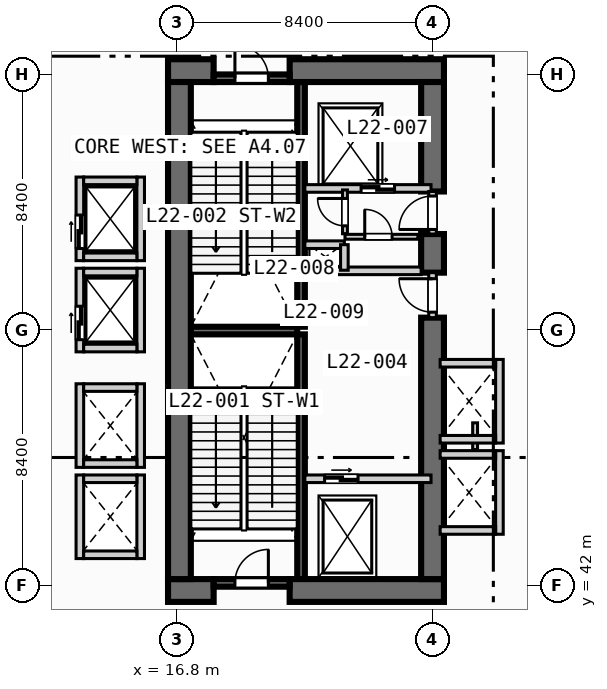
"""IFC4 building model, lengths in metres.
Left out: names, types, materials, properties, quantities, classifications, styles, units other than length and angle.
Written with IfcOpenShell. Run it as: python <this file> out.ifc"""

import sys

from ifc_helpers import new_model, si_unit, direction, frame, frame_2d, origin, place, context, subcontext, project, spatial, rectangle, extrude, element, fill, save


model = new_model("IFC4")
c1 = context("Model", 3, precision=1e-05, world=origin(), true_north=direction((0.0, 1.0)))
c2 = subcontext(c1, "Body", "Model", "MODEL_VIEW")
j1 = project(units=[si_unit("LENGTHUNIT", "METRE"), si_unit("PLANEANGLEUNIT", "RADIAN")], contexts=[c1])
p1 = place(None, origin())
s1 = spatial("IfcSite", under=j1, at=p1, CompositionType="ELEMENT")
p2 = place(p1, origin())
s2 = spatial("IfcBuilding", under=s1, at=p2, CompositionType="ELEMENT")
p3 = place(p2, frame((0.0, 0.0, 94.0)))
s3 = spatial("IfcBuildingStorey", under=s2, at=p3, CompositionType="ELEMENT", Elevation=94.0)
for number, where, z_axis, x_axis in (
    (1, (20.875, 42.2, 0.0), (0.0, 0.0, 1.0), (0.0, 1.0, 0.0)),
    (2, (20.875, 50.5, 0.0), (0.0, 0.0, 1.0), (0.0, 1.0, 0.0)),
):
    element("IfcWall", number, at=place(p3, frame(where, z_axis=z_axis, x_axis=x_axis)), inside=s3, PredefinedType="SOLIDWALL", context=c2, shape_type="SweptSolid", body=[
        extrude(rectangle(XDim=8.05, YDim=0.25, at=frame_2d((4.025, 0.0))), origin(), (0.0, 0.0, 1.0), 5.75),
    ])
p4 = place(p3, frame((17.25, 50.375, 0.0), z_axis=(0.0, 0.0, 1.0), x_axis=(1.0, 0.0, 0.0)))
e3 = element("IfcWall", 3, at=p4, inside=s3, PredefinedType="SOLIDWALL", context=c2, shape_type="SweptSolid", body=[
    extrude(rectangle(XDim=3.5, YDim=0.25, at=frame_2d((1.75, 0.0))), origin(), (0.0, 0.0, 1.0), 5.75),
])
p5 = place(p3, frame((16.5, 41.825, 0.0), z_axis=(0.0, 0.0, 1.0), x_axis=(1.0, 0.0, 0.0)))
e4 = element("IfcWall", 4, at=p5, inside=s3, PredefinedType="SHEAR", context=c2, shape_type="SweptSolid", body=[
    extrude(rectangle(XDim=1.5, YDim=0.75, at=frame_2d((0.75, 0.0))), origin(), (0.0, 0.0, 1.0), 5.75),
])
p6 = place(p3, frame((20.5, 41.825, 0.0), z_axis=(0.0, 0.0, 1.0), x_axis=(1.0, 0.0, 0.0)))
e5 = element("IfcWall", 5, at=p6, inside=s3, PredefinedType="SHEAR", context=c2, shape_type="SweptSolid", body=[
    extrude(rectangle(XDim=5.075, YDim=0.75, at=frame_2d((2.538, 0.0))), origin(), (0.0, 0.0, 1.0), 5.75),
])
p7 = place(p3, frame((16.5, 58.925, 0.0), z_axis=(0.0, 0.0, 1.0), x_axis=(1.0, 0.0, 0.0)))
e6 = element("IfcWall", 6, at=p7, inside=s3, PredefinedType="SHEAR", context=c2, shape_type="SweptSolid", body=[
    extrude(rectangle(XDim=1.5, YDim=0.75, at=frame_2d((0.75, 0.0))), origin(), (0.0, 0.0, 1.0), 5.75),
])
p8 = place(p3, frame((20.5, 58.925, 0.0), z_axis=(0.0, 0.0, 1.0), x_axis=(1.0, 0.0, 0.0)))
e7 = element("IfcWall", 7, at=p8, inside=s3, PredefinedType="SHEAR", context=c2, shape_type="SweptSolid", body=[
    extrude(rectangle(XDim=5.075, YDim=0.75, at=frame_2d((2.538, 0.0))), origin(), (0.0, 0.0, 1.0), 5.75),
])
p9 = place(p3, frame((16.875, 42.2, 0.0), z_axis=(0.0, 0.0, 1.0), x_axis=(0.0, 1.0, 0.0)))
e8 = element("IfcWall", 8, at=p9, inside=s3, PredefinedType="SHEAR", context=c2, shape_type="SweptSolid", body=[
    extrude(rectangle(XDim=16.35, YDim=0.75, at=frame_2d((8.175, 0.0))), origin(), (0.0, 0.0, 1.0), 5.75),
])
p10 = place(p3, frame((25.2, 42.2, 0.0), z_axis=(0.0, 0.0, 1.0), x_axis=(0.0, 1.0, 0.0)))
e9 = element("IfcWall", 9, at=p10, inside=s3, PredefinedType="SHEAR", context=c2, shape_type="SweptSolid", body=[
    extrude(rectangle(XDim=8.6, YDim=0.75, at=frame_2d((4.3, 0.0))), origin(), (0.0, 0.0, 1.0), 5.75),
])
p11 = place(p3, frame((25.2, 52.28, 0.0), z_axis=(0.0, 0.0, 1.0), x_axis=(0.0, 1.0, 0.0)))
e10 = element("IfcWall", 10, at=p11, inside=s3, PredefinedType="SHEAR", context=c2, shape_type="SweptSolid", body=[
    extrude(rectangle(XDim=1.27, YDim=0.75, at=frame_2d((0.635, 0.0))), origin(), (0.0, 0.0, 1.0), 5.75),
])
p12 = place(p3, frame((25.2, 54.95, 0.0), z_axis=(0.0, 0.0, 1.0), x_axis=(0.0, 1.0, 0.0)))
e11 = element("IfcWall", 11, at=p12, inside=s3, PredefinedType="SHEAR", context=c2, shape_type="SweptSolid", body=[
    extrude(rectangle(XDim=3.6, YDim=0.75, at=frame_2d((1.8, 0.0))), origin(), (0.0, 0.0, 1.0), 5.75),
])
p13 = place(p3, frame((18.0, 42.075, 0.0), z_axis=(0.0, 0.0, 1.0), x_axis=(1.0, 0.0, 0.0)))
e12 = element("IfcWall", 12, at=p13, inside=s3, PredefinedType="SOLIDWALL", context=c2, shape_type="SweptSolid", body=[
    extrude(rectangle(XDim=2.5, YDim=0.25, at=frame_2d((1.25, 0.0))), origin(), (0.0, 0.0, 1.0), 5.75),
])
p14 = place(p13, frame((0.7, 0.0, 0.0)))
e13 = element("IfcOpeningElement", 13, at=p14, cuts=e12, PredefinedType="OPENING", context=c2, shape_type="SweptSolid", body=[
    extrude(rectangle(XDim=1.1, YDim=2.15, at=frame_2d((0.55, 1.075))), frame((0.0, 0.135, 0.0), z_axis=(0.0, -1.0, 0.0), x_axis=(1.0, 0.0, 0.0)), (0.0, 0.0, 1.0), 0.27),
])
p15 = place(p3, frame((18.0, 58.675, 0.0), z_axis=(0.0, 0.0, 1.0), x_axis=(1.0, 0.0, 0.0)))
e14 = element("IfcWall", 14, at=p15, inside=s3, PredefinedType="SOLIDWALL", context=c2, shape_type="SweptSolid", body=[
    extrude(rectangle(XDim=2.5, YDim=0.25, at=frame_2d((1.25, 0.0))), origin(), (0.0, 0.0, 1.0), 5.75),
])
p16 = place(p15, frame((0.7, 0.0, 0.0)))
e15 = element("IfcOpeningElement", 15, at=p16, cuts=e14, PredefinedType="OPENING", context=c2, shape_type="SweptSolid", body=[
    extrude(rectangle(XDim=1.1, YDim=2.15, at=frame_2d((0.55, 1.075))), frame((0.0, 0.135, 0.0), z_axis=(0.0, -1.0, 0.0), x_axis=(1.0, 0.0, 0.0)), (0.0, 0.0, 1.0), 0.27),
])
p17 = place(p3, frame((21.0, 45.5, 0.0), z_axis=(0.0, 0.0, 1.0), x_axis=(1.0, 0.0, 0.0)))
e16 = element("IfcWall", 16, at=p17, inside=s3, PredefinedType="SOLIDWALL", context=c2, shape_type="SweptSolid", body=[
    extrude(rectangle(XDim=4.15, YDim=0.25, at=frame_2d((2.075, 0.0))), origin(), (0.0, 0.0, 1.0), 5.75),
])
p18 = place(p17, frame((0.65, 0.0, 0.0)))
e17 = element("IfcOpeningElement", 17, at=p18, cuts=e16, PredefinedType="OPENING", context=c2, shape_type="SweptSolid", body=[
    extrude(rectangle(XDim=1.1, YDim=2.15, at=frame_2d((0.55, 1.075))), frame((0.0, 0.135, 0.0), z_axis=(0.0, -1.0, 0.0), x_axis=(1.0, 0.0, 0.0)), (0.0, 0.0, 1.0), 0.27),
])
p19 = place(p3, frame((25.2, 50.8, 0.0), z_axis=(0.0, 0.0, 1.0), x_axis=(0.0, 1.0, 0.0)))
e18 = element("IfcWall", 18, at=p19, inside=s3, PredefinedType="SOLIDWALL", context=c2, shape_type="SweptSolid", body=[
    extrude(rectangle(XDim=1.48, YDim=0.25, at=frame_2d((0.74, 0.0))), origin(), (0.0, 0.0, 1.0), 5.75),
])
p20 = place(p19, frame((0.18, 0.0, 0.0)))
e19 = element("IfcOpeningElement", 19, at=p20, cuts=e18, PredefinedType="OPENING", context=c2, shape_type="SweptSolid", body=[
    extrude(rectangle(XDim=1.1, YDim=2.15, at=frame_2d((0.55, 1.075))), frame((0.0, 0.135, 0.0), z_axis=(0.0, -1.0, 0.0), x_axis=(1.0, 0.0, 0.0)), (0.0, 0.0, 1.0), 0.27),
])
p21 = place(p3, frame((21.0, 52.34, 0.0), z_axis=(0.0, 0.0, 1.0), x_axis=(1.0, 0.0, 0.0)))
e20 = element("IfcWall", 20, at=p21, inside=s3, PredefinedType="SOLIDWALL", context=c2, shape_type="SweptSolid", body=[
    extrude(rectangle(XDim=3.825, YDim=0.25, at=frame_2d((1.913, 0.0))), origin(), (0.0, 0.0, 1.0), 5.75),
])
p22 = place(p3, frame((21.0, 55.05, 0.0), z_axis=(0.0, 0.0, 1.0), x_axis=(1.0, 0.0, 0.0)))
e21 = element("IfcWall", 21, at=p22, inside=s3, PredefinedType="SOLIDWALL", context=c2, shape_type="SweptSolid", body=[
    extrude(rectangle(XDim=4.15, YDim=0.25, at=frame_2d((2.075, 0.0))), origin(), (0.0, 0.0, 1.0), 5.75),
])
p23 = place(p22, frame((1.85, 0.0, 0.0)))
e22 = element("IfcOpeningElement", 22, at=p23, cuts=e21, PredefinedType="OPENING", context=c2, shape_type="SweptSolid", body=[
    extrude(rectangle(XDim=1.1, YDim=2.15, at=frame_2d((0.55, 1.075))), frame((0.0, 0.135, 0.0), z_axis=(0.0, -1.0, 0.0), x_axis=(1.0, 0.0, 0.0)), (0.0, 0.0, 1.0), 0.27),
])
p24 = place(p3, frame((25.2, 53.55, 0.0), z_axis=(0.0, 0.0, 1.0), x_axis=(0.0, 1.0, 0.0)))
e23 = element("IfcWall", 23, at=p24, inside=s3, PredefinedType="SOLIDWALL", context=c2, shape_type="SweptSolid", body=[
    extrude(rectangle(XDim=1.4, YDim=0.25, at=frame_2d((0.7, 0.0))), origin(), (0.0, 0.0, 1.0), 5.75),
])
p25 = place(p24, frame((0.15, 0.0, 0.0)))
e24 = element("IfcOpeningElement", 24, at=p25, cuts=e23, PredefinedType="OPENING", context=c2, shape_type="SweptSolid", body=[
    extrude(rectangle(XDim=1.1, YDim=2.15, at=frame_2d((0.55, 1.075))), frame((0.0, 0.135, 0.0), z_axis=(0.0, -1.0, 0.0), x_axis=(1.0, 0.0, 0.0)), (0.0, 0.0, 1.0), 0.27),
])
p26 = place(p3, frame((21.0, 53.2, 0.0), z_axis=(0.0, 0.0, 1.0), x_axis=(1.0, 0.0, 0.0)))
e25 = element("IfcWall", 25, at=p26, inside=s3, PredefinedType="SOLIDWALL", context=c2, shape_type="SweptSolid", body=[
    extrude(rectangle(XDim=1.3, YDim=0.25, at=frame_2d((0.65, 0.0))), origin(), (0.0, 0.0, 1.0), 5.75),
])
p27 = place(p3, frame((22.3, 52.36, 0.0), z_axis=(0.0, 0.0, 1.0), x_axis=(0.0, 1.0, 0.0)))
e26 = element("IfcWall", 26, at=p27, inside=s3, PredefinedType="SOLIDWALL", context=c2, shape_type="SweptSolid", body=[
    extrude(rectangle(XDim=0.84, YDim=0.25, at=frame_2d((0.42, 0.0))), origin(), (0.0, 0.0, 1.0), 5.75),
])
p28 = place(p3, frame((22.32, 53.56, 0.0), z_axis=(0.0, 0.0, 1.0), x_axis=(0.0, 1.0, 0.0)))
e27 = element("IfcWall", 27, at=p28, inside=s3, PredefinedType="PARTITIONING", context=c2, shape_type="SweptSolid", body=[
    extrude(rectangle(XDim=1.44, YDim=0.16, at=frame_2d((0.72, 0.0))), origin(), (0.0, 0.0, 1.0), 5.75),
])
p29 = place(p28, frame((0.26, 0.0, 0.0)))
e28 = element("IfcOpeningElement", 28, at=p29, cuts=e27, PredefinedType="OPENING", context=c2, shape_type="SweptSolid", body=[
    extrude(rectangle(XDim=0.9, YDim=2.1, at=frame_2d((0.45, 1.05))), frame((0.0, 0.09, 0.0), z_axis=(0.0, -1.0, 0.0), x_axis=(1.0, 0.0, 0.0)), (0.0, 0.0, 1.0), 0.18),
])
p30 = place(p3, frame((22.32, 53.46, 0.0), z_axis=(0.0, 0.0, 1.0), x_axis=(1.0, 0.0, 0.0)))
e29 = element("IfcWall", 29, at=p30, inside=s3, PredefinedType="PARTITIONING", context=c2, shape_type="SweptSolid", body=[
    extrude(rectangle(XDim=2.4, YDim=0.16, at=frame_2d((1.2, 0.0))), origin(), (0.0, 0.0, 1.0), 5.75),
])
p31 = place(p30, frame((0.65, 0.0, 0.0)))
e30 = element("IfcOpeningElement", 30, at=p31, cuts=e29, PredefinedType="OPENING", context=c2, shape_type="SweptSolid", body=[
    extrude(rectangle(XDim=0.9, YDim=2.1, at=frame_2d((0.45, 1.05))), frame((0.0, 0.09, 0.0), z_axis=(0.0, -1.0, 0.0), x_axis=(1.0, 0.0, 0.0)), (0.0, 0.0, 1.0), 0.18),
])
for number, where, z_axis, x_axis in (
    (31, (13.6, 42.875, 0.0), (0.0, 0.0, 1.0), (0.0, 1.0, 0.0)),
    (32, (15.6, 42.875, 0.0), (0.0, 0.0, 1.0), (0.0, 1.0, 0.0)),
):
    element("IfcWall", number, at=place(p3, frame(where, z_axis=z_axis, x_axis=x_axis)), inside=s3, PredefinedType="SOLIDWALL", context=c2, shape_type="SweptSolid", body=[
        extrude(rectangle(XDim=2.75, YDim=0.25, at=frame_2d((1.375, 0.0))), origin(), (0.0, 0.0, 1.0), 5.75),
    ])
for number, where, z_axis, x_axis in (
    (33, (13.725, 43.0, 0.0), (0.0, 0.0, 1.0), (1.0, 0.0, 0.0)),
    (34, (13.725, 45.5, 0.0), (0.0, 0.0, 1.0), (1.0, 0.0, 0.0)),
):
    element("IfcWall", number, at=place(p3, frame(where, z_axis=z_axis, x_axis=x_axis)), inside=s3, PredefinedType="SOLIDWALL", context=c2, shape_type="SweptSolid", body=[
        extrude(rectangle(XDim=1.75, YDim=0.25, at=frame_2d((0.875, 0.0))), origin(), (0.0, 0.0, 1.0), 5.75),
    ])
for number, where, z_axis, x_axis in (
    (35, (13.6, 45.875, 0.0), (0.0, 0.0, 1.0), (0.0, 1.0, 0.0)),
    (36, (15.6, 45.875, 0.0), (0.0, 0.0, 1.0), (0.0, 1.0, 0.0)),
):
    element("IfcWall", number, at=place(p3, frame(where, z_axis=z_axis, x_axis=x_axis)), inside=s3, PredefinedType="SOLIDWALL", context=c2, shape_type="SweptSolid", body=[
        extrude(rectangle(XDim=2.75, YDim=0.25, at=frame_2d((1.375, 0.0))), origin(), (0.0, 0.0, 1.0), 5.75),
    ])
for number, where, z_axis, x_axis in (
    (37, (13.725, 46.0, 0.0), (0.0, 0.0, 1.0), (1.0, 0.0, 0.0)),
    (38, (13.725, 48.5, 0.0), (0.0, 0.0, 1.0), (1.0, 0.0, 0.0)),
):
    element("IfcWall", number, at=place(p3, frame(where, z_axis=z_axis, x_axis=x_axis)), inside=s3, PredefinedType="SOLIDWALL", context=c2, shape_type="SweptSolid", body=[
        extrude(rectangle(XDim=1.75, YDim=0.25, at=frame_2d((0.875, 0.0))), origin(), (0.0, 0.0, 1.0), 5.75),
    ])
p32 = place(p3, frame((13.6, 49.675, 0.0), z_axis=(0.0, 0.0, 1.0), x_axis=(0.0, 1.0, 0.0)))
e39 = element("IfcWall", 39, at=p32, inside=s3, PredefinedType="SOLIDWALL", context=c2, shape_type="SweptSolid", body=[
    extrude(rectangle(XDim=2.75, YDim=0.25, at=frame_2d((1.375, 0.0))), origin(), (0.0, 0.0, 1.0), 5.75),
])
p33 = place(p32, frame((0.4, 0.0, 0.0)))
e40 = element("IfcOpeningElement", 40, at=p33, cuts=e39, PredefinedType="OPENING", context=c2, shape_type="SweptSolid", body=[
    extrude(rectangle(XDim=1.1, YDim=2.15, at=frame_2d((0.55, 1.075))), frame((0.0, 0.135, 0.0), z_axis=(0.0, -1.0, 0.0), x_axis=(1.0, 0.0, 0.0)), (0.0, 0.0, 1.0), 0.27),
])
p34 = place(p3, frame((15.6, 49.675, 0.0), z_axis=(0.0, 0.0, 1.0), x_axis=(0.0, 1.0, 0.0)))
e41 = element("IfcWall", 41, at=p34, inside=s3, PredefinedType="SOLIDWALL", context=c2, shape_type="SweptSolid", body=[
    extrude(rectangle(XDim=2.75, YDim=0.25, at=frame_2d((1.375, 0.0))), origin(), (0.0, 0.0, 1.0), 5.75),
])
for number, where, z_axis, x_axis in (
    (42, (13.725, 49.8, 0.0), (0.0, 0.0, 1.0), (1.0, 0.0, 0.0)),
    (43, (13.725, 52.3, 0.0), (0.0, 0.0, 1.0), (1.0, 0.0, 0.0)),
):
    element("IfcWall", number, at=place(p3, frame(where, z_axis=z_axis, x_axis=x_axis)), inside=s3, PredefinedType="SOLIDWALL", context=c2, shape_type="SweptSolid", body=[
        extrude(rectangle(XDim=1.75, YDim=0.25, at=frame_2d((0.875, 0.0))), origin(), (0.0, 0.0, 1.0), 5.75),
    ])
p35 = place(p3, frame((13.6, 52.675, 0.0), z_axis=(0.0, 0.0, 1.0), x_axis=(0.0, 1.0, 0.0)))
e44 = element("IfcWall", 44, at=p35, inside=s3, PredefinedType="SOLIDWALL", context=c2, shape_type="SweptSolid", body=[
    extrude(rectangle(XDim=2.75, YDim=0.25, at=frame_2d((1.375, 0.0))), origin(), (0.0, 0.0, 1.0), 5.75),
])
p36 = place(p35, frame((0.4, 0.0, 0.0)))
e45 = element("IfcOpeningElement", 45, at=p36, cuts=e44, PredefinedType="OPENING", context=c2, shape_type="SweptSolid", body=[
    extrude(rectangle(XDim=1.1, YDim=2.15, at=frame_2d((0.55, 1.075))), frame((0.0, 0.135, 0.0), z_axis=(0.0, -1.0, 0.0), x_axis=(1.0, 0.0, 0.0)), (0.0, 0.0, 1.0), 0.27),
])
p37 = place(p3, frame((15.6, 52.675, 0.0), z_axis=(0.0, 0.0, 1.0), x_axis=(0.0, 1.0, 0.0)))
e46 = element("IfcWall", 46, at=p37, inside=s3, PredefinedType="SOLIDWALL", context=c2, shape_type="SweptSolid", body=[
    extrude(rectangle(XDim=2.75, YDim=0.25, at=frame_2d((1.375, 0.0))), origin(), (0.0, 0.0, 1.0), 5.75),
])
for number, where, z_axis, x_axis in (
    (47, (13.725, 52.8, 0.0), (0.0, 0.0, 1.0), (1.0, 0.0, 0.0)),
    (48, (13.725, 55.3, 0.0), (0.0, 0.0, 1.0), (1.0, 0.0, 0.0)),
):
    element("IfcWall", number, at=place(p3, frame(where, z_axis=z_axis, x_axis=x_axis)), inside=s3, PredefinedType="SOLIDWALL", context=c2, shape_type="SweptSolid", body=[
        extrude(rectangle(XDim=1.75, YDim=0.25, at=frame_2d((0.875, 0.0))), origin(), (0.0, 0.0, 1.0), 5.75),
    ])
p38 = place(p3, frame((27.4, 43.675, 0.0), z_axis=(0.0, 0.0, 1.0), x_axis=(0.0, 1.0, 0.0)))
e49 = element("IfcWall", 49, at=p38, inside=s3, PredefinedType="SOLIDWALL", context=c2, shape_type="SweptSolid", body=[
    extrude(rectangle(XDim=2.75, YDim=0.25, at=frame_2d((1.375, 0.0))), origin(), (0.0, 0.0, 1.0), 5.75),
])
for number, where, z_axis, x_axis in (
    (50, (25.45, 43.8, 0.0), (0.0, 0.0, 1.0), (1.0, 0.0, 0.0)),
    (51, (25.45, 46.3, 0.0), (0.0, 0.0, 1.0), (1.0, 0.0, 0.0)),
):
    element("IfcWall", number, at=place(p3, frame(where, z_axis=z_axis, x_axis=x_axis)), inside=s3, PredefinedType="SOLIDWALL", context=c2, shape_type="SweptSolid", body=[
        extrude(rectangle(XDim=1.825, YDim=0.25, at=frame_2d((0.913, 0.0))), origin(), (0.0, 0.0, 1.0), 5.75),
    ])
p39 = place(p3, frame((26.6, 46.46, 0.0), z_axis=(0.0, 0.0, 1.0), x_axis=(0.0, 1.0, 0.0)))
e52 = element("IfcWall", 52, at=p39, inside=s3, PredefinedType="PARTITIONING", context=c2, shape_type="SweptSolid", body=[
    extrude(rectangle(XDim=0.88, YDim=0.16, at=frame_2d((0.44, 0.0))), origin(), (0.0, 0.0, 1.0), 5.75),
])
p40 = place(p3, frame((27.4, 46.675, 0.0), z_axis=(0.0, 0.0, 1.0), x_axis=(0.0, 1.0, 0.0)))
e53 = element("IfcWall", 53, at=p40, inside=s3, PredefinedType="SOLIDWALL", context=c2, shape_type="SweptSolid", body=[
    extrude(rectangle(XDim=2.75, YDim=0.25, at=frame_2d((1.375, 0.0))), origin(), (0.0, 0.0, 1.0), 5.75),
])
for number, where, z_axis, x_axis in (
    (54, (25.45, 46.8, 0.0), (0.0, 0.0, 1.0), (1.0, 0.0, 0.0)),
    (55, (25.45, 49.3, 0.0), (0.0, 0.0, 1.0), (1.0, 0.0, 0.0)),
):
    element("IfcWall", number, at=place(p3, frame(where, z_axis=z_axis, x_axis=x_axis)), inside=s3, PredefinedType="SOLIDWALL", context=c2, shape_type="SweptSolid", body=[
        extrude(rectangle(XDim=1.825, YDim=0.25, at=frame_2d((0.913, 0.0))), origin(), (0.0, 0.0, 1.0), 5.75),
    ])
p41 = place(p14, origin())
e56 = element("IfcDoor", 56, at=p41, inside=s3, OperationType="SINGLE_SWING_RIGHT", PredefinedType="DOOR", context=c2, shape_type="SweptSolid", body=[
    extrude(rectangle(XDim=1.1, YDim=2.15, at=frame_2d((0.55, 1.075))), frame((0.0, 0.025, 0.0), z_axis=(0.0, -1.0, 0.0), x_axis=(1.0, 0.0, 0.0)), (0.0, 0.0, 1.0), 0.05),
])
fill(e13, e56)
p42 = place(p16, origin())
e57 = element("IfcDoor", 57, at=p42, inside=s3, OperationType="SINGLE_SWING_LEFT", PredefinedType="DOOR", context=c2, shape_type="SweptSolid", body=[
    extrude(rectangle(XDim=1.1, YDim=2.15, at=frame_2d((0.55, 1.075))), frame((0.0, 0.025, 0.0), z_axis=(0.0, -1.0, 0.0), x_axis=(1.0, 0.0, 0.0)), (0.0, 0.0, 1.0), 0.05),
])
fill(e15, e57)
p43 = place(p18, origin())
e58 = element("IfcDoor", 58, at=p43, inside=s3, OperationType="SLIDING_TO_LEFT", PredefinedType="DOOR", context=c2, shape_type="SweptSolid", body=[
    extrude(rectangle(XDim=1.1, YDim=2.15, at=frame_2d((0.55, 1.075))), frame((0.0, 0.025, 0.0), z_axis=(0.0, -1.0, 0.0), x_axis=(1.0, 0.0, 0.0)), (0.0, 0.0, 1.0), 0.05),
])
fill(e17, e58)
p44 = place(p20, origin())
e59 = element("IfcDoor", 59, at=p44, inside=s3, OperationType="SINGLE_SWING_RIGHT", PredefinedType="DOOR", context=c2, shape_type="SweptSolid", body=[
    extrude(rectangle(XDim=1.1, YDim=2.15, at=frame_2d((0.55, 1.075))), frame((0.0, 0.025, 0.0), z_axis=(0.0, -1.0, 0.0), x_axis=(1.0, 0.0, 0.0)), (0.0, 0.0, 1.0), 0.05),
])
fill(e19, e59)
p45 = place(p23, origin())
e60 = element("IfcDoor", 60, at=p45, inside=s3, OperationType="SLIDING_TO_LEFT", PredefinedType="DOOR", context=c2, shape_type="SweptSolid", body=[
    extrude(rectangle(XDim=1.1, YDim=2.15, at=frame_2d((0.55, 1.075))), frame((0.0, 0.025, 0.0), z_axis=(0.0, -1.0, 0.0), x_axis=(1.0, 0.0, 0.0)), (0.0, 0.0, 1.0), 0.05),
])
fill(e22, e60)
p46 = place(p25, origin())
e61 = element("IfcDoor", 61, at=p46, inside=s3, OperationType="SINGLE_SWING_LEFT", PredefinedType="DOOR", context=c2, shape_type="SweptSolid", body=[
    extrude(rectangle(XDim=1.1, YDim=2.15, at=frame_2d((0.55, 1.075))), frame((0.0, 0.025, 0.0), z_axis=(0.0, -1.0, 0.0), x_axis=(1.0, 0.0, 0.0)), (0.0, 0.0, 1.0), 0.05),
])
fill(e24, e61)
p47 = place(p29, origin())
e62 = element("IfcDoor", 62, at=p47, inside=s3, OperationType="SINGLE_SWING_RIGHT", PredefinedType="DOOR", context=c2, shape_type="SweptSolid", body=[
    extrude(rectangle(XDim=0.9, YDim=2.1, at=frame_2d((0.45, 1.05))), frame((0.0, 0.025, 0.0), z_axis=(0.0, -1.0, 0.0), x_axis=(1.0, 0.0, 0.0)), (0.0, 0.0, 1.0), 0.05),
])
fill(e28, e62)
p48 = place(p31, origin())
e63 = element("IfcDoor", 63, at=p48, inside=s3, OperationType="SINGLE_SWING_LEFT", PredefinedType="DOOR", context=c2, shape_type="SweptSolid", body=[
    extrude(rectangle(XDim=0.9, YDim=2.1, at=frame_2d((0.45, 1.05))), frame((0.0, 0.025, 0.0), z_axis=(0.0, -1.0, 0.0), x_axis=(1.0, 0.0, 0.0)), (0.0, 0.0, 1.0), 0.05),
])
fill(e30, e63)
p49 = place(p33, origin())
e64 = element("IfcDoor", 64, at=p49, inside=s3, OperationType="SLIDING_TO_LEFT", PredefinedType="DOOR", context=c2, shape_type="SweptSolid", body=[
    extrude(rectangle(XDim=1.1, YDim=2.15, at=frame_2d((0.55, 1.075))), frame((0.0, 0.025, 0.0), z_axis=(0.0, -1.0, 0.0), x_axis=(1.0, 0.0, 0.0)), (0.0, 0.0, 1.0), 0.05),
])
fill(e40, e64)
p50 = place(p36, origin())
e65 = element("IfcDoor", 65, at=p50, inside=s3, OperationType="SLIDING_TO_LEFT", PredefinedType="DOOR", context=c2, shape_type="SweptSolid", body=[
    extrude(rectangle(XDim=1.1, YDim=2.15, at=frame_2d((0.55, 1.075))), frame((0.0, 0.025, 0.0), z_axis=(0.0, -1.0, 0.0), x_axis=(1.0, 0.0, 0.0)), (0.0, 0.0, 1.0), 0.05),
])
fill(e45, e65)
save(model, sys.argv[1])
